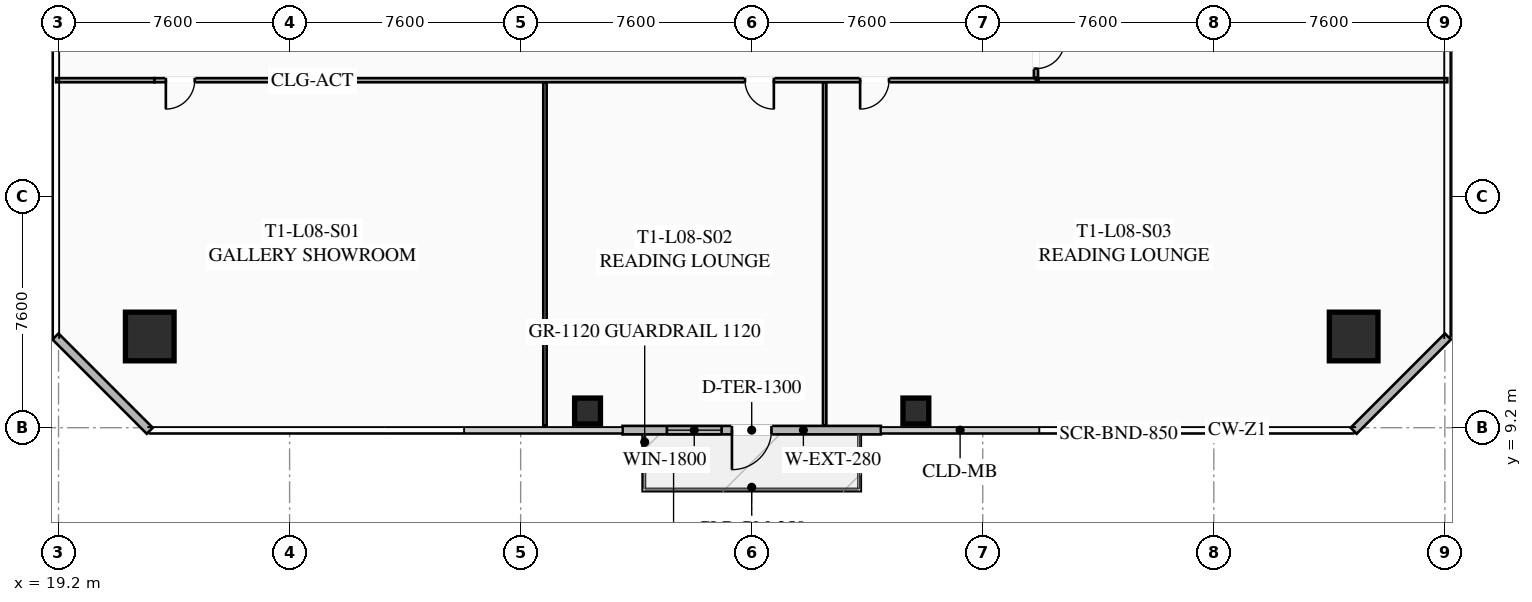
"""IFC4 building model, lengths in metres.
Left out: names, types, materials, properties, quantities, classifications, styles, units other than length and angle.
Written with IfcOpenShell. Run it as: python <this file> out.ifc"""

import sys

from ifc_helpers import new_model, si_unit, direction, frame, frame_2d, origin, origin_2d, place, context, subcontext, project, spatial, rectangle, hollow_rectangle, extrude, element, fill, save


model = new_model("IFC4")
c1 = context("Model", 3, precision=1e-05, world=origin(), true_north=direction((0.0, 1.0)))
c2 = subcontext(c1, "Body", "Model", "MODEL_VIEW")
j1 = project(units=[si_unit("LENGTHUNIT", "METRE"), si_unit("PLANEANGLEUNIT", "RADIAN")], contexts=[c1])
p1 = place(None, origin())
s1 = spatial("IfcSite", under=j1, at=p1, CompositionType="ELEMENT")
p2 = place(p1, origin())
s2 = spatial("IfcBuilding", under=s1, at=p2, CompositionType="ELEMENT")
p3 = place(p2, frame((0.0, 0.0, 35.25)))
s3 = spatial("IfcBuildingStorey", under=s2, at=p3, CompositionType="ELEMENT", Elevation=35.25)
for number, where, z_axis, x_axis in (
    (1, (22.2, 12.2, 0.0), (0.0, 0.0, 1.0), (1.0, 0.0, 0.0)),
    (2, (61.8, 12.2, 0.0), (0.0, 0.0, 1.0), (1.0, 0.0, 0.0)),
):
    element("IfcColumn", number, at=place(p3, frame(where, z_axis=z_axis, x_axis=x_axis)), inside=s3, PredefinedType="COLUMN", context=c2, shape_type="SweptSolid", body=[
        extrude(hollow_rectangle(XDim=1.6, YDim=1.6, WallThickness=0.06, at=origin_2d()), origin(), (0.0, 0.0, 1.0), 3.35),
    ])
for number, where, z_axis, x_axis in (
    (3, (36.6, 9.75, 0.0), (0.0, 0.0, 1.0), (1.0, 0.0, 0.0)),
    (4, (47.4, 9.75, 0.0), (0.0, 0.0, 1.0), (1.0, 0.0, 0.0)),
):
    element("IfcColumn", number, at=place(p3, frame(where, z_axis=z_axis, x_axis=x_axis)), inside=s3, PredefinedType="COLUMN", context=c2, shape_type="SweptSolid", body=[
        extrude(hollow_rectangle(XDim=0.85, YDim=0.85, WallThickness=0.035, at=origin_2d()), origin(), (0.0, 0.0, 1.0), 3.35),
    ])
p4 = place(p3, frame((46.25, 9.12, 0.0), z_axis=(0.0, 0.0, 1.0), x_axis=(-1.0, 0.0, 0.0)))
e5 = element("IfcWall", 5, at=p4, inside=s3, PredefinedType="SOLIDWALL", context=c2, shape_type="SweptSolid", body=[
    extrude(rectangle(XDim=8.5, YDim=0.28, at=frame_2d((4.25, 0.0))), origin(), (0.0, 0.0, 1.0), 3.35),
])
p5 = place(p4, frame((3.6, 0.0, 0.0)))
e6 = element("IfcOpeningElement", 6, at=p5, cuts=e5, PredefinedType="OPENING", context=c2, shape_type="SweptSolid", body=[
    extrude(rectangle(XDim=1.3, YDim=2.15, at=frame_2d((0.65, 1.075))), frame((0.0, 0.15, 0.0), z_axis=(0.0, -1.0, 0.0), x_axis=(1.0, 0.0, 0.0)), (0.0, 0.0, 1.0), 0.3),
])
p6 = place(p4, frame((5.24, 0.0, 0.85)))
e7 = element("IfcOpeningElement", 7, at=p6, cuts=e5, PredefinedType="OPENING", context=c2, shape_type="SweptSolid", body=[
    extrude(rectangle(XDim=1.8, YDim=1.92, at=frame_2d((0.9, 0.96))), frame((0.0, 0.15, 0.0), z_axis=(0.0, -1.0, 0.0), x_axis=(1.0, 0.0, 0.0)), (0.0, 0.0, 1.0), 0.3),
])
for number, where, z_axis, x_axis in (
    (8, (22.2, 9.1, 0.0), (0.0, 0.0, 1.0), (-0.707, 0.707, 0.0)),
    (9, (64.9, 12.2, 0.0), (0.0, 0.0, 1.0), (-0.707, -0.707, 0.0)),
):
    element("IfcWall", number, at=place(p3, frame(where, z_axis=z_axis, x_axis=x_axis)), inside=s3, PredefinedType="SOLIDWALL", context=c2, shape_type="SweptSolid", body=[
        extrude(rectangle(XDim=4.384, YDim=0.28, at=frame_2d((2.192, 0.0))), origin(), (0.0, 0.0, 1.0), 3.35),
    ])
p7 = place(p3, frame((51.35, 20.63, 0.0), z_axis=(0.0, 0.0, 1.0), x_axis=(-1.0, 0.0, 0.0)))
e10 = element("IfcWall", 10, at=p7, inside=s3, PredefinedType="PARTITIONING", context=c2, shape_type="SweptSolid", body=[
    extrude(rectangle(XDim=29.0, YDim=0.135, at=frame_2d((14.5, 0.0))), origin(), (0.0, 0.0, 1.0), 2.703),
])
p8 = place(p7, frame((27.67, 0.0, 0.0)))
e11 = element("IfcOpeningElement", 11, at=p8, cuts=e10, PredefinedType="OPENING", context=c2, shape_type="SweptSolid", body=[
    extrude(rectangle(XDim=0.95, YDim=2.05, at=frame_2d((0.475, 1.025))), frame((0.0, 0.077, 0.0), z_axis=(0.0, -1.0, 0.0), x_axis=(1.0, 0.0, 0.0)), (0.0, 0.0, 1.0), 0.155),
])
p9 = place(p7, frame((8.621, 0.0, 0.0)))
e12 = element("IfcOpeningElement", 12, at=p9, cuts=e10, PredefinedType="OPENING", context=c2, shape_type="SweptSolid", body=[
    extrude(rectangle(XDim=0.95, YDim=2.05, at=frame_2d((0.475, 1.025))), frame((0.0, 0.077, 0.0), z_axis=(0.0, -1.0, 0.0), x_axis=(1.0, 0.0, 0.0)), (0.0, 0.0, 1.0), 0.155),
])
p10 = place(p7, frame((4.834, 0.0, 0.0)))
e13 = element("IfcOpeningElement", 13, at=p10, cuts=e10, PredefinedType="OPENING", context=c2, shape_type="SweptSolid", body=[
    extrude(rectangle(XDim=0.95, YDim=2.05, at=frame_2d((0.475, 1.025))), frame((0.0, 0.077, 0.0), z_axis=(0.0, -1.0, 0.0), x_axis=(1.0, 0.0, 0.0)), (0.0, 0.0, 1.0), 0.155),
])
p11 = place(p3, frame((19.12, 20.63, 0.0), z_axis=(0.0, 0.0, 1.0), x_axis=(1.0, 0.0, 0.0)))
e14 = element("IfcWall", 14, at=p11, inside=s3, PredefinedType="PARTITIONING", context=c2, shape_type="SweptSolid", body=[
    extrude(rectangle(XDim=3.23, YDim=0.135, at=frame_2d((1.615, 0.0))), origin(), (0.0, 0.0, 1.0), 2.703),
])
for number, where, z_axis, x_axis in (
    (15, (35.2, 9.27, 0.0), (0.0, 0.0, 1.0), (0.0, 1.0, 0.0)),
    (16, (44.4, 9.27, 0.0), (0.0, 0.0, 1.0), (0.0, 1.0, 0.0)),
):
    element("IfcWall", number, at=place(p3, frame(where, z_axis=z_axis, x_axis=x_axis)), inside=s3, PredefinedType="PARTITIONING", context=c2, shape_type="SweptSolid", body=[
        extrude(rectangle(XDim=11.28, YDim=0.11, at=frame_2d((5.64, 0.0))), origin(), (0.0, 0.0, 1.0), 2.703),
    ])
p12 = place(p3, frame((51.35, 42.37, 0.0), z_axis=(0.0, 0.0, 1.0), x_axis=(0.0, -1.0, 0.0)))
e17 = element("IfcWall", 17, at=p12, inside=s3, PredefinedType="PARTITIONING", context=c2, shape_type="SweptSolid", body=[
    extrude(rectangle(XDim=21.66, YDim=0.135, at=frame_2d((10.83, 0.0))), origin(), (0.0, 0.0, 1.0), 2.703),
])
p13 = place(p12, frame((20.41, 0.0, 0.0)))
e18 = element("IfcOpeningElement", 18, at=p13, cuts=e17, PredefinedType="OPENING", context=c2, shape_type="SweptSolid", body=[
    extrude(rectangle(XDim=0.95, YDim=2.05, at=frame_2d((0.475, 1.025))), frame((0.0, 0.077, 0.0), z_axis=(0.0, -1.0, 0.0), x_axis=(1.0, 0.0, 0.0)), (0.0, 0.0, 1.0), 0.155),
])
p14 = place(p3, frame((51.43, 20.63, 0.0), z_axis=(0.0, 0.0, 1.0), x_axis=(1.0, 0.0, 0.0)))
e19 = element("IfcWall", 19, at=p14, inside=s3, PredefinedType="PARTITIONING", context=c2, shape_type="SweptSolid", body=[
    extrude(rectangle(XDim=13.45, YDim=0.135, at=frame_2d((6.725, 0.0))), origin(), (0.0, 0.0, 1.0), 2.703),
])
p15 = place(p5, origin())
e20 = element("IfcDoor", 20, at=p15, inside=s3, OperationType="SINGLE_SWING_RIGHT", PredefinedType="DOOR", context=c2, shape_type="SweptSolid", body=[
    extrude(rectangle(XDim=1.3, YDim=2.15, at=frame_2d((0.65, 1.075))), frame((0.0, 0.025, 0.0), z_axis=(0.0, -1.0, 0.0), x_axis=(1.0, 0.0, 0.0)), (0.0, 0.0, 1.0), 0.05),
])
fill(e6, e20)
p16 = place(p6, origin())
e21 = element("IfcWindow", 21, at=p16, inside=s3, PartitioningType="SINGLE_PANEL", PredefinedType="WINDOW", context=c2, shape_type="SweptSolid", body=[
    extrude(rectangle(XDim=1.8, YDim=1.92, at=frame_2d((0.9, 0.96))), frame((0.0, 0.03, 0.0), z_axis=(0.0, -1.0, 0.0), x_axis=(1.0, 0.0, 0.0)), (0.0, 0.0, 1.0), 0.06),
])
fill(e7, e21)
p17 = place(p8, origin())
e22 = element("IfcDoor", 22, at=p17, inside=s3, OperationType="SINGLE_SWING_RIGHT", PredefinedType="DOOR", context=c2, shape_type="SweptSolid", body=[
    extrude(rectangle(XDim=0.95, YDim=2.05, at=frame_2d((0.475, 1.025))), frame((0.0, 0.025, 0.0), z_axis=(0.0, -1.0, 0.0), x_axis=(1.0, 0.0, 0.0)), (0.0, 0.0, 1.0), 0.05),
])
fill(e11, e22)
p18 = place(p9, origin())
e23 = element("IfcDoor", 23, at=p18, inside=s3, OperationType="SINGLE_SWING_LEFT", PredefinedType="DOOR", context=c2, shape_type="SweptSolid", body=[
    extrude(rectangle(XDim=0.95, YDim=2.05, at=frame_2d((0.475, 1.025))), frame((0.0, 0.025, 0.0), z_axis=(0.0, -1.0, 0.0), x_axis=(1.0, 0.0, 0.0)), (0.0, 0.0, 1.0), 0.05),
])
fill(e12, e23)
p19 = place(p10, origin())
e24 = element("IfcDoor", 24, at=p19, inside=s3, OperationType="SINGLE_SWING_RIGHT", PredefinedType="DOOR", context=c2, shape_type="SweptSolid", body=[
    extrude(rectangle(XDim=0.95, YDim=2.05, at=frame_2d((0.475, 1.025))), frame((0.0, 0.025, 0.0), z_axis=(0.0, -1.0, 0.0), x_axis=(1.0, 0.0, 0.0)), (0.0, 0.0, 1.0), 0.05),
])
fill(e13, e24)
p20 = place(p13, origin())
e25 = element("IfcDoor", 25, at=p20, inside=s3, OperationType="SINGLE_SWING_LEFT", PredefinedType="DOOR", context=c2, shape_type="SweptSolid", body=[
    extrude(rectangle(XDim=0.95, YDim=2.05, at=frame_2d((0.475, 1.025))), frame((0.0, 0.025, 0.0), z_axis=(0.0, -1.0, 0.0), x_axis=(1.0, 0.0, 0.0)), (0.0, 0.0, 1.0), 0.05),
])
fill(e18, e25)
save(model, sys.argv[1])
